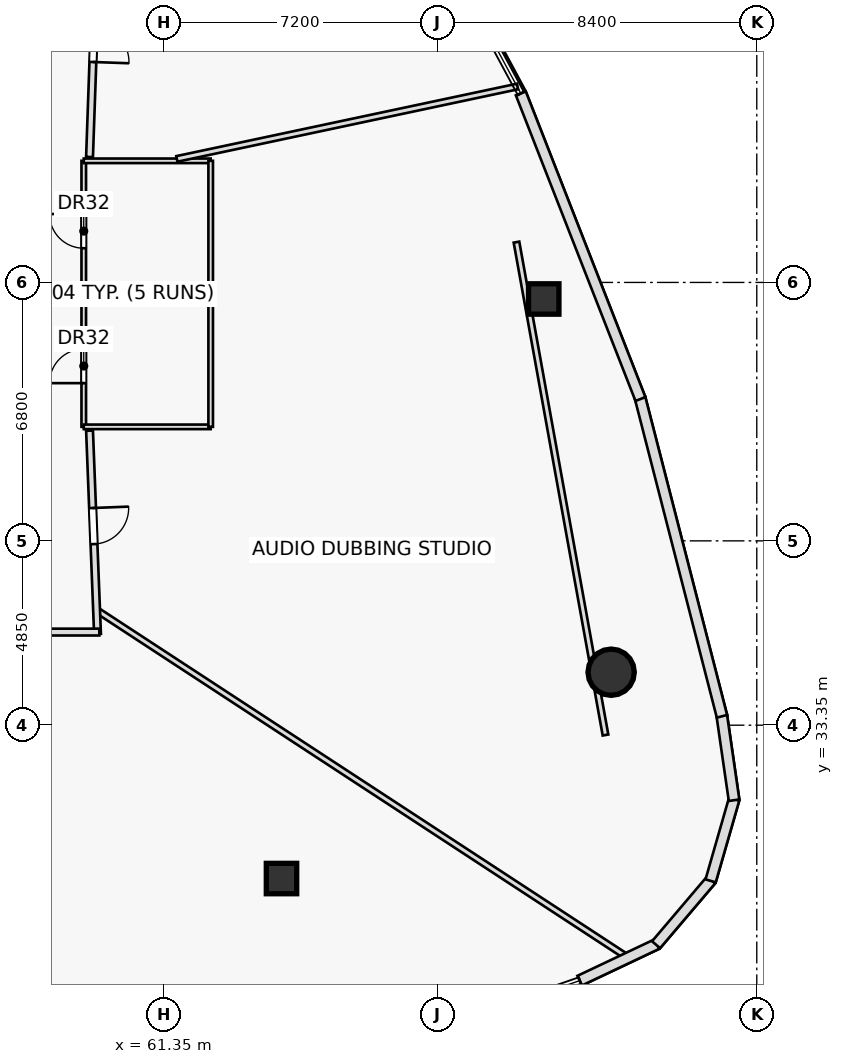
"""IFC4 building model, lengths in metres.
Left out: names, types, materials, properties, quantities, classifications, styles, units other than length and angle.
Written with IfcOpenShell. Run it as: python <this file> out.ifc"""

import sys

from ifc_helpers import new_model, si_unit, direction, frame, frame_2d, origin, origin_2d, place, context, subcontext, project, spatial, rectangle, hollow_rectangle, hollow_circle, extrude, element, fill, save


model = new_model("IFC4")
c1 = context("Model", 3, precision=1e-05, world=origin(), true_north=direction((0.0, 1.0)))
c2 = subcontext(c1, "Body", "Model", "MODEL_VIEW")
j1 = project(units=[si_unit("LENGTHUNIT", "METRE"), si_unit("PLANEANGLEUNIT", "RADIAN")], contexts=[c1])
p1 = place(None, origin())
s1 = spatial("IfcSite", under=j1, at=p1, CompositionType="ELEMENT")
p2 = place(p1, origin())
s2 = spatial("IfcBuilding", under=s1, at=p2, CompositionType="ELEMENT")
p3 = place(p2, frame((0.0, 0.0, 31.5)))
s3 = spatial("IfcBuildingStorey", under=s2, at=p3, CompositionType="ELEMENT", Elevation=31.5)
p4 = place(p3, frame((64.444, 29.315, 0.0), z_axis=(0.0, 0.0, 1.0), x_axis=(1.0, 0.0, 0.0)))
e1 = element("IfcColumn", 1, at=p4, inside=s3, PredefinedType="COLUMN", context=c2, shape_type="SweptSolid", body=[
    extrude(hollow_rectangle(XDim=0.8, YDim=0.8, WallThickness=0.045, at=origin_2d()), origin(), (0.0, 0.0, 1.0), 3.6),
])
p5 = place(p3, frame((73.118, 34.744, 0.0), z_axis=(0.0, 0.0, 1.0), x_axis=(1.0, 0.0, 0.0)))
e2 = element("IfcColumn", 2, at=p5, inside=s3, PredefinedType="COLUMN", context=c2, shape_type="SweptSolid", body=[
    extrude(hollow_circle(Radius=0.61, WallThickness=0.05, at=origin_2d()), origin(), (0.0, 0.0, 1.0), 3.6),
])
p6 = place(p3, frame((71.344, 44.565, 0.0), z_axis=(0.0, 0.0, 1.0), x_axis=(1.0, 0.0, 0.0)))
e3 = element("IfcColumn", 3, at=p6, inside=s3, PredefinedType="COLUMN", context=c2, shape_type="SweptSolid", body=[
    extrude(hollow_rectangle(XDim=0.8, YDim=0.8, WallThickness=0.045, at=origin_2d()), origin(), (0.0, 0.0, 1.0), 3.6),
])
p7 = place(p3, frame((72.969, 33.091, 0.0), z_axis=(0.0, 0.0, 1.0), x_axis=(-0.177742578179, 0.984077017261, 0.0)))
e4 = element("IfcWall", 4, at=p7, inside=s3, PredefinedType="PARTITIONING", context=c2, shape_type="SweptSolid", body=[
    extrude(rectangle(XDim=13.179, YDim=0.15, at=frame_2d((6.59, 0.0))), origin(), (0.0, 0.0, 1.0), 2.925),
])
p8 = place(p3, frame((59.24, 41.2, 0.0), z_axis=(0.0, 0.0, 1.0), x_axis=(0.0, 1.0, 0.0)))
e5 = element("IfcWall", 5, at=p8, inside=s3, PredefinedType="PARTITIONING", context=c2, shape_type="SweptSolid", body=[
    extrude(rectangle(XDim=7.0, YDim=0.12, at=frame_2d((3.5, 0.0))), origin(), (0.0, 0.0, 1.0), 3.6),
])
p9 = place(p8, frame((1.15, 0.0, 0.0)))
e6 = element("IfcOpeningElement", 6, at=p9, cuts=e5, PredefinedType="OPENING", context=c2, shape_type="SweptSolid", body=[
    extrude(rectangle(XDim=0.9, YDim=2.05, at=frame_2d((0.45, 1.025))), frame((0.0, 0.07, 0.0), z_axis=(0.0, -1.0, 0.0), x_axis=(1.0, 0.0, 0.0)), (0.0, 0.0, 1.0), 0.14),
])
p10 = place(p8, frame((4.7, 0.0, 0.0)))
e7 = element("IfcOpeningElement", 7, at=p10, cuts=e5, PredefinedType="OPENING", context=c2, shape_type="SweptSolid", body=[
    extrude(rectangle(XDim=0.9, YDim=2.05, at=frame_2d((0.45, 1.025))), frame((0.0, 0.07, 0.0), z_axis=(0.0, -1.0, 0.0), x_axis=(1.0, 0.0, 0.0)), (0.0, 0.0, 1.0), 0.14),
])
p11 = place(p3, frame((59.24, 41.2, 0.0), z_axis=(0.0, 0.0, 1.0), x_axis=(1.0, 0.0, 0.0)))
e8 = element("IfcWall", 8, at=p11, inside=s3, PredefinedType="PARTITIONING", context=c2, shape_type="SweptSolid", body=[
    extrude(rectangle(XDim=3.34, YDim=0.12, at=frame_2d((1.67, 0.0))), origin(), (0.0, 0.0, 1.0), 2.925),
])
for number, where, z_axis, x_axis in (
    (9, (59.24, 44.65, 0.0), (0.0, 0.0, 1.0), (1.0, 0.0, 0.0)),
    (10, (59.24, 48.2, 0.0), (0.0, 0.0, 1.0), (1.0, 0.0, 0.0)),
):
    element("IfcWall", number, at=place(p3, frame(where, z_axis=z_axis, x_axis=x_axis)), inside=s3, PredefinedType="PARTITIONING", context=c2, shape_type="SweptSolid", body=[
        extrude(rectangle(XDim=3.34, YDim=0.12, at=frame_2d((1.67, 0.0))), origin(), (0.0, 0.0, 1.0), 3.6),
    ])
p12 = place(p3, frame((62.58, 41.2, 0.0), z_axis=(0.0, 0.0, 1.0), x_axis=(0.0, 1.0, 0.0)))
e11 = element("IfcWall", 11, at=p12, inside=s3, PredefinedType="PARTITIONING", context=c2, shape_type="SweptSolid", body=[
    extrude(rectangle(XDim=7.0, YDim=0.12, at=frame_2d((3.5, 0.0))), origin(), (0.0, 0.0, 1.0), 3.6),
])
p13 = place(p3, frame((61.69, 48.25, 0.0), z_axis=(0.0, 0.0, 1.0), x_axis=(0.978145714451, 0.207920564881, 0.0)))
e12 = element("IfcWall", 12, at=p13, inside=s3, PredefinedType="PARTITIONING", context=c2, shape_type="SweptSolid", body=[
    extrude(rectangle(XDim=9.165, YDim=0.15, at=frame_2d((4.582, 0.0))), origin(), (0.0, 0.0, 1.0), 2.975),
])
p14 = place(p3, frame((59.577, 36.381, 0.0), z_axis=(0.0, 0.0, 1.0), x_axis=(0.83686493474, -0.547409427214, 0.0)))
e13 = element("IfcWall", 13, at=p14, inside=s3, PredefinedType="PARTITIONING", context=c2, shape_type="SweptSolid", body=[
    extrude(rectangle(XDim=16.725, YDim=0.15, at=frame_2d((8.362, 0.0))), origin(), (0.0, 0.0, 1.0), 2.975),
])
p15 = place(p3, frame((59.602, 54.25, 0.0), z_axis=(0.0, 0.0, 1.0), x_axis=(-0.035265891834, -0.999377964973, 0.0)))
e14 = element("IfcWall", 14, at=p15, inside=s3, PredefinedType="PARTITIONING", context=c2, shape_type="SweptSolid", body=[
    extrude(rectangle(XDim=5.954, YDim=0.18, at=frame_2d((2.977, 0.0))), origin(), (0.0, 0.0, 1.0), 2.925),
])
p16 = place(p15, frame((2.502, 0.0, 0.0)))
e15 = element("IfcOpeningElement", 15, at=p16, cuts=e14, PredefinedType="OPENING", context=c2, shape_type="SweptSolid", body=[
    extrude(rectangle(XDim=0.95, YDim=2.05, at=frame_2d((0.475, 1.025))), frame((0.0, 0.1, 0.0), z_axis=(0.0, -1.0, 0.0), x_axis=(1.0, 0.0, 0.0)), (0.0, 0.0, 1.0), 0.2),
])
p17 = place(p3, frame((59.392, 41.1, 0.0), z_axis=(0.0, 0.0, 1.0), x_axis=(0.03921413315, -0.999230830069, 0.0)))
e16 = element("IfcWall", 16, at=p17, inside=s3, PredefinedType="PARTITIONING", context=c2, shape_type="SweptSolid", body=[
    extrude(rectangle(XDim=5.354, YDim=0.18, at=frame_2d((2.677, 0.0))), origin(), (0.0, 0.0, 1.0), 2.925),
])
p18 = place(p17, frame((2.037, 0.0, 0.0)))
e17 = element("IfcOpeningElement", 17, at=p18, cuts=e16, PredefinedType="OPENING", context=c2, shape_type="SweptSolid", body=[
    extrude(rectangle(XDim=0.95, YDim=2.05, at=frame_2d((0.475, 1.025))), frame((0.0, 0.1, 0.0), z_axis=(0.0, -1.0, 0.0), x_axis=(1.0, 0.0, 0.0)), (0.0, 0.0, 1.0), 0.2),
])
p19 = place(p3, frame((59.65, 35.8, 0.0), z_axis=(0.0, 0.0, 1.0), x_axis=(-1.0, 0.0, 0.0)))
e18 = element("IfcWall", 18, at=p19, inside=s3, PredefinedType="PARTITIONING", context=c2, shape_type="SweptSolid", body=[
    extrude(rectangle(XDim=22.15, YDim=0.18, at=frame_2d((11.075, 0.0))), origin(), (0.0, 0.0, 1.0), 2.925),
])
p20 = place(p19, frame((6.254, 0.0, 0.0)))
e19 = element("IfcOpeningElement", 19, at=p20, cuts=e18, PredefinedType="OPENING", context=c2, shape_type="SweptSolid", body=[
    extrude(rectangle(XDim=0.95, YDim=2.05, at=frame_2d((0.475, 1.025))), frame((0.0, 0.1, 0.0), z_axis=(0.0, -1.0, 0.0), x_axis=(1.0, 0.0, 0.0)), (0.0, 0.0, 1.0), 0.2),
])
p21 = place(p19, frame((15.103, 0.0, 0.0)))
e20 = element("IfcOpeningElement", 20, at=p21, cuts=e18, PredefinedType="OPENING", context=c2, shape_type="SweptSolid", body=[
    extrude(rectangle(XDim=0.95, YDim=2.05, at=frame_2d((0.475, 1.025))), frame((0.0, 0.1, 0.0), z_axis=(0.0, -1.0, 0.0), x_axis=(1.0, 0.0, 0.0)), (0.0, 0.0, 1.0), 0.2),
])
p22 = place(p3, frame((72.29, 26.628, 0.0), z_axis=(0.0, 0.0, 1.0), x_axis=(0.903751094917, 0.42805835868, 0.0)))
e21 = element("IfcWall", 21, at=p22, inside=s3, PredefinedType="STANDARD", context=c2, shape_type="SweptSolid", body=[
    extrude(rectangle(XDim=2.25, YDim=0.28, at=frame_2d((1.125, 0.0))), origin(), (0.0, 0.0, 1.0), 3.6),
])
p23 = place(p3, frame((74.3, 27.574, 0.0), z_axis=(0.0, 0.0, 1.0), x_axis=(0.64752494063, 0.762044258073, 0.0)))
e22 = element("IfcWall", 22, at=p23, inside=s3, PredefinedType="STANDARD", context=c2, shape_type="SweptSolid", body=[
    extrude(rectangle(XDim=2.239, YDim=0.28, at=frame_2d((1.119, 0.0))), origin(), (0.0, 0.0, 1.0), 3.6),
])
p24 = place(p3, frame((75.736, 29.254, 0.0), z_axis=(0.0, 0.0, 1.0), x_axis=(0.276492535008, 0.961016065467, 0.0)))
e23 = element("IfcWall", 23, at=p24, inside=s3, PredefinedType="STANDARD", context=c2, shape_type="SweptSolid", body=[
    extrude(rectangle(XDim=2.238, YDim=0.28, at=frame_2d((1.119, 0.0))), origin(), (0.0, 0.0, 1.0), 3.6),
])
p25 = place(p3, frame((76.352, 31.376, 0.0), z_axis=(0.0, 0.0, 1.0), x_axis=(-0.143507242298, 0.989649266866, 0.0)))
e24 = element("IfcWall", 24, at=p25, inside=s3, PredefinedType="STANDARD", context=c2, shape_type="SweptSolid", body=[
    extrude(rectangle(XDim=2.261, YDim=0.28, at=frame_2d((1.13, 0.0))), origin(), (0.0, 0.0, 1.0), 3.6),
])
p26 = place(p3, frame((76.034, 33.584, 0.0), z_axis=(0.0, 0.0, 1.0), x_axis=(-0.249078863516, 0.968483205714, 0.0)))
e25 = element("IfcWall", 25, at=p26, inside=s3, PredefinedType="STANDARD", context=c2, shape_type="SweptSolid", body=[
    extrude(rectangle(XDim=8.649, YDim=0.28, at=frame_2d((4.325, 0.0))), origin(), (0.0, 0.0, 1.0), 3.6),
])
p27 = place(p3, frame((73.889, 41.932, 0.0), z_axis=(0.0, 0.0, 1.0), x_axis=(-0.364469689699, 0.931215251857, 0.0)))
e26 = element("IfcWall", 26, at=p27, inside=s3, PredefinedType="STANDARD", context=c2, shape_type="SweptSolid", body=[
    extrude(rectangle(XDim=8.637, YDim=0.28, at=frame_2d((4.318, 0.0))), origin(), (0.0, 0.0, 1.0), 3.6),
])
p28 = place(p9, origin())
e27 = element("IfcDoor", 27, at=p28, inside=s3, OperationType="SINGLE_SWING_LEFT", PredefinedType="DOOR", context=c2, shape_type="SweptSolid", body=[
    extrude(rectangle(XDim=0.9, YDim=2.05, at=frame_2d((0.45, 1.025))), frame((0.0, 0.025, 0.0), z_axis=(0.0, -1.0, 0.0), x_axis=(1.0, 0.0, 0.0)), (0.0, 0.0, 1.0), 0.05),
])
fill(e6, e27)
p29 = place(p10, origin())
e28 = element("IfcDoor", 28, at=p29, inside=s3, OperationType="SINGLE_SWING_RIGHT", PredefinedType="DOOR", context=c2, shape_type="SweptSolid", body=[
    extrude(rectangle(XDim=0.9, YDim=2.05, at=frame_2d((0.45, 1.025))), frame((0.0, 0.025, 0.0), z_axis=(0.0, -1.0, 0.0), x_axis=(1.0, 0.0, 0.0)), (0.0, 0.0, 1.0), 0.05),
])
fill(e7, e28)
p30 = place(p16, origin())
e29 = element("IfcDoor", 29, at=p30, inside=s3, OperationType="SINGLE_SWING_RIGHT", PredefinedType="DOOR", context=c2, shape_type="SweptSolid", body=[
    extrude(rectangle(XDim=0.95, YDim=2.05, at=frame_2d((0.475, 1.025))), frame((0.0, 0.025, 0.0), z_axis=(0.0, -1.0, 0.0), x_axis=(1.0, 0.0, 0.0)), (0.0, 0.0, 1.0), 0.05),
])
fill(e15, e29)
p31 = place(p18, origin())
e30 = element("IfcDoor", 30, at=p31, inside=s3, OperationType="SINGLE_SWING_LEFT", PredefinedType="DOOR", context=c2, shape_type="SweptSolid", body=[
    extrude(rectangle(XDim=0.95, YDim=2.05, at=frame_2d((0.475, 1.025))), frame((0.0, 0.025, 0.0), z_axis=(0.0, -1.0, 0.0), x_axis=(1.0, 0.0, 0.0)), (0.0, 0.0, 1.0), 0.05),
])
fill(e17, e30)
save(model, sys.argv[1])
